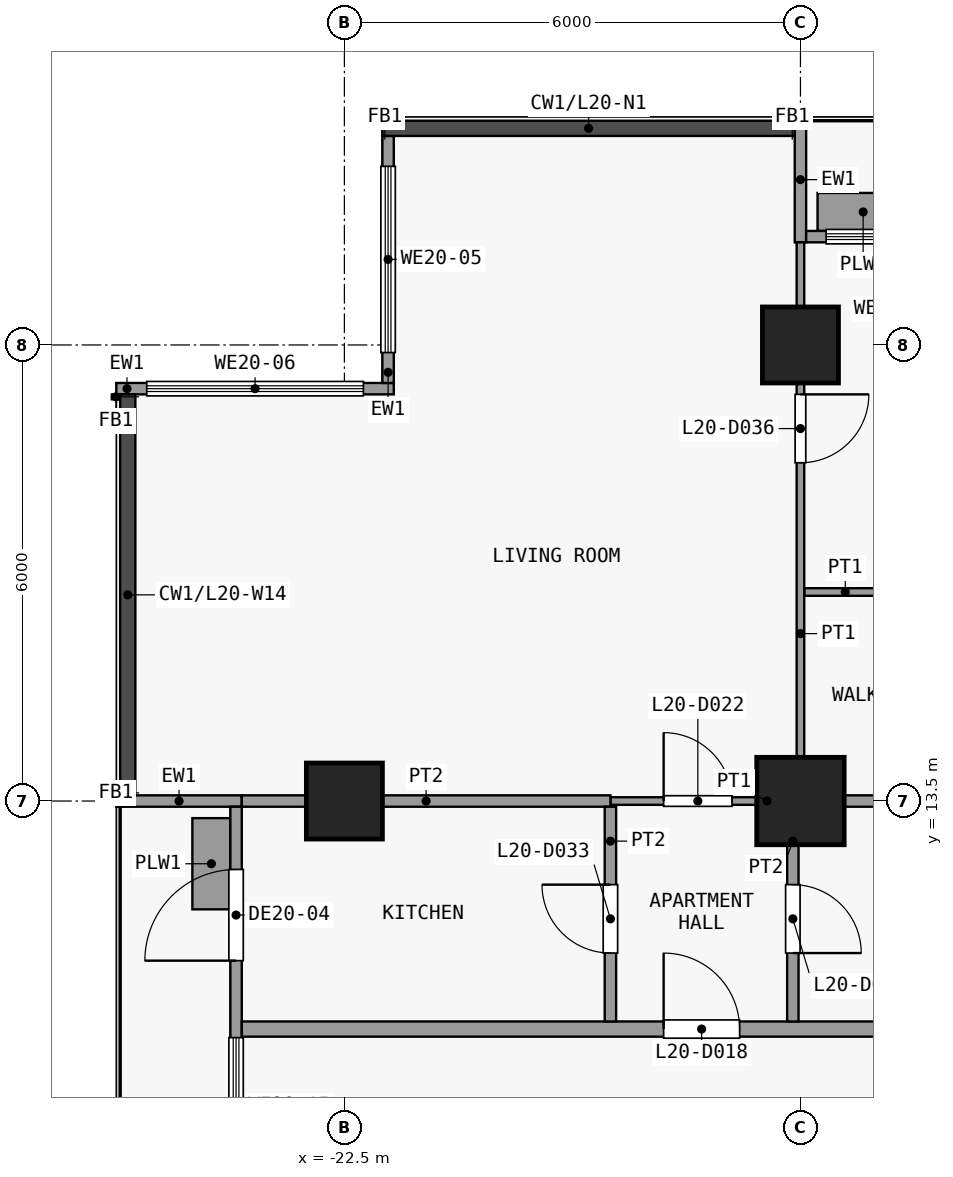
"""IFC4 building model, lengths in metres.
Left out: names, types, materials, properties, quantities, classifications, styles, units other than length and angle.
Written with IfcOpenShell. Run it as: python <this file> out.ifc"""

import sys

from ifc_helpers import new_model, si_unit, direction, frame, frame_2d, origin, origin_2d, place, context, subcontext, project, spatial, rectangle, extrude, element, fill, save


model = new_model("IFC4")
c1 = context("Model", 3, precision=1e-05, world=origin(), true_north=direction((0.0, 1.0)))
c2 = subcontext(c1, "Body", "Model", "MODEL_VIEW")
j1 = project(units=[si_unit("LENGTHUNIT", "METRE"), si_unit("PLANEANGLEUNIT", "RADIAN")], contexts=[c1])
p1 = place(None, origin())
s1 = spatial("IfcSite", under=j1, at=p1, CompositionType="ELEMENT")
p2 = place(p1, origin())
s2 = spatial("IfcBuilding", under=s1, at=p2, CompositionType="ELEMENT")
p3 = place(p2, frame((0.0, 0.0, 84.7)))
s3 = spatial("IfcBuildingStorey", under=s2, at=p3, CompositionType="ELEMENT", Elevation=84.7)
p4 = place(p3, frame((-22.5, 13.5, 0.0), z_axis=(0.0, 0.0, 1.0), x_axis=(1.0, 0.0, 0.0)))
e1 = element("IfcColumn", 1, at=p4, inside=s3, PredefinedType="COLUMN", context=c2, shape_type="SweptSolid", body=[
    extrude(rectangle(XDim=1.0, YDim=1.0, at=origin_2d()), origin(), (0.0, 0.0, 1.0), 3.6),
])
p5 = place(p3, frame((-16.5, 13.5, 0.0), z_axis=(0.0, 0.0, 1.0), x_axis=(1.0, 0.0, 0.0)))
e2 = element("IfcColumn", 2, at=p5, inside=s3, PredefinedType="COLUMN", context=c2, shape_type="SweptSolid", body=[
    extrude(rectangle(XDim=1.15, YDim=1.15, at=origin_2d()), origin(), (0.0, 0.0, 1.0), 3.6),
])
p6 = place(p3, frame((-16.5, 19.5, 0.0), z_axis=(0.0, 0.0, 1.0), x_axis=(1.0, 0.0, 0.0)))
e3 = element("IfcColumn", 3, at=p6, inside=s3, PredefinedType="COLUMN", context=c2, shape_type="SweptSolid", body=[
    extrude(rectangle(XDim=1.0, YDim=1.0, at=origin_2d()), origin(), (0.0, 0.0, 1.0), 3.6),
])
p7 = place(p3, frame((-21.925, 19.0, 0.0), z_axis=(0.0, 0.0, 1.0), x_axis=(0.0, 1.0, 0.0)))
e4 = element("IfcWall", 4, at=p7, inside=s3, PredefinedType="SOLIDWALL", context=c2, shape_type="SweptSolid", body=[
    extrude(rectangle(XDim=3.25, YDim=0.15, at=frame_2d((1.625, 0.0))), origin(), (0.0, 0.0, 1.0), 3.3),
])
p8 = place(p7, frame((0.4, 0.0, 0.9)))
e5 = element("IfcOpeningElement", 5, at=p8, cuts=e4, PredefinedType="OPENING", context=c2, shape_type="SweptSolid", body=[
    extrude(rectangle(XDim=2.45, YDim=2.4, at=frame_2d((1.225, 1.2))), frame((0.0, 0.085, 0.0), z_axis=(0.0, -1.0, 0.0), x_axis=(1.0, 0.0, 0.0)), (0.0, 0.0, 1.0), 0.17),
])
p9 = place(p3, frame((-25.5, 18.925, 0.0), z_axis=(0.0, 0.0, 1.0), x_axis=(1.0, 0.0, 0.0)))
e6 = element("IfcWall", 6, at=p9, inside=s3, PredefinedType="SOLIDWALL", context=c2, shape_type="SweptSolid", body=[
    extrude(rectangle(XDim=3.65, YDim=0.15, at=frame_2d((1.825, 0.0))), origin(), (0.0, 0.0, 1.0), 3.3),
])
p10 = place(p9, frame((0.4, 0.0, 0.9)))
e7 = element("IfcOpeningElement", 7, at=p10, cuts=e6, PredefinedType="OPENING", context=c2, shape_type="SweptSolid", body=[
    extrude(rectangle(XDim=2.85, YDim=2.4, at=frame_2d((1.425, 1.2))), frame((0.0, 0.085, 0.0), z_axis=(0.0, -1.0, 0.0), x_axis=(1.0, 0.0, 0.0)), (0.0, 0.0, 1.0), 0.17),
])
p11 = place(p3, frame((-16.5, 20.85, 0.0), z_axis=(0.0, 0.0, 1.0), x_axis=(0.0, 1.0, 0.0)))
e8 = element("IfcWall", 8, at=p11, inside=s3, PredefinedType="SOLIDWALL", context=c2, shape_type="SweptSolid", body=[
    extrude(rectangle(XDim=1.65, YDim=0.15, at=frame_2d((0.825, 0.0))), origin(), (0.0, 0.0, 1.0), 3.3),
])
p12 = place(p3, frame((-16.425, 20.925, 0.0), z_axis=(0.0, 0.0, 1.0), x_axis=(1.0, 0.0, 0.0)))
e9 = element("IfcWall", 9, at=p12, inside=s3, PredefinedType="SOLIDWALL", context=c2, shape_type="SweptSolid", body=[
    extrude(rectangle(XDim=5.85, YDim=0.15, at=frame_2d((2.925, 0.0))), origin(), (0.0, 0.0, 1.0), 3.3),
])
p13 = place(p12, frame((2.325, 0.0, 0.0)))
e10 = element("IfcOpeningElement", 10, at=p13, cuts=e9, PredefinedType="OPENING", context=c2, shape_type="SweptSolid", body=[
    extrude(rectangle(XDim=1.2, YDim=2.4, at=frame_2d((0.6, 1.2))), frame((0.0, 0.085, 0.0), z_axis=(0.0, -1.0, 0.0), x_axis=(1.0, 0.0, 0.0)), (0.0, 0.0, 1.0), 0.17),
])
p14 = place(p12, frame((0.262, 0.0, 0.9)))
e11 = element("IfcOpeningElement", 11, at=p14, cuts=e9, PredefinedType="OPENING", context=c2, shape_type="SweptSolid", body=[
    extrude(rectangle(XDim=1.8, YDim=2.1, at=frame_2d((0.9, 1.05))), frame((0.0, 0.085, 0.0), z_axis=(0.0, -1.0, 0.0), x_axis=(1.0, 0.0, 0.0)), (0.0, 0.0, 1.0), 0.17),
])
p15 = place(p12, frame((3.788, 0.0, 0.9)))
e12 = element("IfcOpeningElement", 12, at=p15, cuts=e9, PredefinedType="OPENING", context=c2, shape_type="SweptSolid", body=[
    extrude(rectangle(XDim=1.8, YDim=2.1, at=frame_2d((0.9, 1.05))), frame((0.0, 0.085, 0.0), z_axis=(0.0, -1.0, 0.0), x_axis=(1.0, 0.0, 0.0)), (0.0, 0.0, 1.0), 0.17),
])
p16 = place(p3, frame((-16.275, 21.25, 0.0), z_axis=(0.0, 0.0, 1.0), x_axis=(1.0, 0.0, 0.0)))
e13 = element("IfcWall", 13, at=p16, inside=s3, PredefinedType="USERDEFINED", context=c2, shape_type="SweptSolid", body=[
    extrude(rectangle(XDim=1.2, YDim=0.5, at=frame_2d((0.6, 0.0))), origin(), (0.0, 0.0, 1.0), 0.9),
])
p17 = place(p3, frame((-23.85, 13.5, 0.0), z_axis=(0.0, 0.0, 1.0), x_axis=(-1.0, 0.0, 0.0)))
e14 = element("IfcWall", 14, at=p17, inside=s3, PredefinedType="SOLIDWALL", context=c2, shape_type="SweptSolid", body=[
    extrude(rectangle(XDim=1.65, YDim=0.15, at=frame_2d((0.825, 0.0))), origin(), (0.0, 0.0, 1.0), 3.3),
])
p18 = place(p3, frame((-23.925, 7.575, 0.0), z_axis=(0.0, 0.0, 1.0), x_axis=(0.0, 1.0, 0.0)))
e15 = element("IfcWall", 15, at=p18, inside=s3, PredefinedType="SOLIDWALL", context=c2, shape_type="SweptSolid", body=[
    extrude(rectangle(XDim=5.85, YDim=0.15, at=frame_2d((2.925, 0.0))), origin(), (0.0, 0.0, 1.0), 3.3),
])
p19 = place(p18, frame((3.825, 0.0, 0.0)))
e16 = element("IfcOpeningElement", 16, at=p19, cuts=e15, PredefinedType="OPENING", context=c2, shape_type="SweptSolid", body=[
    extrude(rectangle(XDim=1.2, YDim=2.4, at=frame_2d((0.6, 1.2))), frame((0.0, 0.085, 0.0), z_axis=(0.0, -1.0, 0.0), x_axis=(1.0, 0.0, 0.0)), (0.0, 0.0, 1.0), 0.17),
])
p20 = place(p18, frame((1.012, 0.0, 0.9)))
e17 = element("IfcOpeningElement", 17, at=p20, cuts=e15, PredefinedType="OPENING", context=c2, shape_type="SweptSolid", body=[
    extrude(rectangle(XDim=1.8, YDim=2.1, at=frame_2d((0.9, 1.05))), frame((0.0, 0.085, 0.0), z_axis=(0.0, -1.0, 0.0), x_axis=(1.0, 0.0, 0.0)), (0.0, 0.0, 1.0), 0.17),
])
p21 = place(p3, frame((-24.25, 12.075, 0.0), z_axis=(0.0, 0.0, 1.0), x_axis=(0.0, 1.0, 0.0)))
e18 = element("IfcWall", 18, at=p21, inside=s3, PredefinedType="USERDEFINED", context=c2, shape_type="SweptSolid", body=[
    extrude(rectangle(XDim=1.2, YDim=0.5, at=frame_2d((0.6, 0.0))), origin(), (0.0, 0.0, 1.0), 0.9),
])
p22 = place(p3, frame((-23.85, 10.5, 0.0), z_axis=(0.0, 0.0, 1.0), x_axis=(1.0, 0.0, 0.0)))
e19 = element("IfcWall", 19, at=p22, inside=s3, PredefinedType="PARTITIONING", context=c2, shape_type="SweptSolid", body=[
    extrude(rectangle(XDim=49.2, YDim=0.2, at=frame_2d((24.6, 0.0))), origin(), (0.0, 0.0, 1.0), 3.3),
])
p23 = place(p22, frame((5.55, 0.0, 0.0)))
e20 = element("IfcOpeningElement", 20, at=p23, cuts=e19, PredefinedType="OPENING", context=c2, shape_type="SweptSolid", body=[
    extrude(rectangle(XDim=1.0, YDim=2.1, at=frame_2d((0.5, 1.05))), frame((0.0, 0.11, 0.0), z_axis=(0.0, -1.0, 0.0), x_axis=(1.0, 0.0, 0.0)), (0.0, 0.0, 1.0), 0.22),
])
p24 = place(p22, frame((14.05, 0.0, 0.0)))
e21 = element("IfcOpeningElement", 21, at=p24, cuts=e19, PredefinedType="OPENING", context=c2, shape_type="SweptSolid", body=[
    extrude(rectangle(XDim=1.0, YDim=2.1, at=frame_2d((0.5, 1.05))), frame((0.0, 0.11, 0.0), z_axis=(0.0, -1.0, 0.0), x_axis=(1.0, 0.0, 0.0)), (0.0, 0.0, 1.0), 0.22),
])
p25 = place(p22, frame((22.55, 0.0, 0.0)))
e22 = element("IfcOpeningElement", 22, at=p25, cuts=e19, PredefinedType="OPENING", context=c2, shape_type="SweptSolid", body=[
    extrude(rectangle(XDim=1.0, YDim=2.1, at=frame_2d((0.5, 1.05))), frame((0.0, 0.11, 0.0), z_axis=(0.0, -1.0, 0.0), x_axis=(1.0, 0.0, 0.0)), (0.0, 0.0, 1.0), 0.22),
])
p26 = place(p22, frame((43.55, 0.0, 0.0)))
e23 = element("IfcOpeningElement", 23, at=p26, cuts=e19, PredefinedType="OPENING", context=c2, shape_type="SweptSolid", body=[
    extrude(rectangle(XDim=1.0, YDim=2.1, at=frame_2d((0.5, 1.05))), frame((0.0, 0.11, 0.0), z_axis=(0.0, -1.0, 0.0), x_axis=(1.0, 0.0, 0.0)), (0.0, 0.0, 1.0), 0.22),
])
p27 = place(p3, frame((-19.0, 13.5, 0.0), z_axis=(0.0, 0.0, 1.0), x_axis=(1.0, 0.0, 0.0)))
e24 = element("IfcWall", 24, at=p27, inside=s3, PredefinedType="PARTITIONING", context=c2, shape_type="SweptSolid", body=[
    extrude(rectangle(XDim=2.4, YDim=0.1, at=frame_2d((1.2, 0.0))), origin(), (0.0, 0.0, 1.0), 3.3),
])
p28 = place(p27, frame((0.7, 0.0, 0.0)))
e25 = element("IfcOpeningElement", 25, at=p28, cuts=e24, PredefinedType="OPENING", context=c2, shape_type="SweptSolid", body=[
    extrude(rectangle(XDim=0.9, YDim=2.1, at=frame_2d((0.45, 1.05))), frame((0.0, 0.06, 0.0), z_axis=(0.0, -1.0, 0.0), x_axis=(1.0, 0.0, 0.0)), (0.0, 0.0, 1.0), 0.12),
])
p29 = place(p3, frame((-23.85, 13.5, 0.0), z_axis=(0.0, 0.0, 1.0), x_axis=(1.0, 0.0, 0.0)))
e26 = element("IfcWall", 26, at=p29, inside=s3, PredefinedType="PARTITIONING", context=c2, shape_type="SweptSolid", body=[
    extrude(rectangle(XDim=4.85, YDim=0.15, at=frame_2d((2.425, 0.0))), origin(), (0.0, 0.0, 1.0), 3.3),
])
p30 = place(p3, frame((-16.5, 13.5, 0.0), z_axis=(0.0, 0.0, 1.0), x_axis=(1.0, 0.0, 0.0)))
e27 = element("IfcWall", 27, at=p30, inside=s3, PredefinedType="PARTITIONING", context=c2, shape_type="SweptSolid", body=[
    extrude(rectangle(XDim=6.0, YDim=0.15, at=frame_2d((3.0, 0.0))), origin(), (0.0, 0.0, 1.0), 3.3),
])
p31 = place(p3, frame((-16.45, 16.25, 0.0), z_axis=(0.0, 0.0, 1.0), x_axis=(1.0, 0.0, 0.0)))
e28 = element("IfcWall", 28, at=p31, inside=s3, PredefinedType="PARTITIONING", context=c2, shape_type="SweptSolid", body=[
    extrude(rectangle(XDim=3.25, YDim=0.1, at=frame_2d((1.625, 0.0))), origin(), (0.0, 0.0, 1.0), 3.3),
])
p32 = place(p31, frame((1.2, 0.0, 0.0)))
e29 = element("IfcOpeningElement", 29, at=p32, cuts=e28, PredefinedType="OPENING", context=c2, shape_type="SweptSolid", body=[
    extrude(rectangle(XDim=0.9, YDim=2.1, at=frame_2d((0.45, 1.05))), frame((0.0, 0.06, 0.0), z_axis=(0.0, -1.0, 0.0), x_axis=(1.0, 0.0, 0.0)), (0.0, 0.0, 1.0), 0.12),
])
p33 = place(p3, frame((-19.0, 10.6, 0.0), z_axis=(0.0, 0.0, 1.0), x_axis=(0.0, 1.0, 0.0)))
e30 = element("IfcWall", 30, at=p33, inside=s3, PredefinedType="PARTITIONING", context=c2, shape_type="SweptSolid", body=[
    extrude(rectangle(XDim=2.825, YDim=0.15, at=frame_2d((1.413, 0.0))), origin(), (0.0, 0.0, 1.0), 3.3),
])
p34 = place(p33, frame((0.9, 0.0, 0.0)))
e31 = element("IfcOpeningElement", 31, at=p34, cuts=e30, PredefinedType="OPENING", context=c2, shape_type="SweptSolid", body=[
    extrude(rectangle(XDim=0.9, YDim=2.1, at=frame_2d((0.45, 1.05))), frame((0.0, 0.085, 0.0), z_axis=(0.0, -1.0, 0.0), x_axis=(1.0, 0.0, 0.0)), (0.0, 0.0, 1.0), 0.17),
])
p35 = place(p3, frame((-16.6, 10.6, 0.0), z_axis=(0.0, 0.0, 1.0), x_axis=(0.0, 1.0, 0.0)))
e32 = element("IfcWall", 32, at=p35, inside=s3, PredefinedType="PARTITIONING", context=c2, shape_type="SweptSolid", body=[
    extrude(rectangle(XDim=2.825, YDim=0.15, at=frame_2d((1.413, 0.0))), origin(), (0.0, 0.0, 1.0), 3.3),
])
p36 = place(p35, frame((0.9, 0.0, 0.0)))
e33 = element("IfcOpeningElement", 33, at=p36, cuts=e32, PredefinedType="OPENING", context=c2, shape_type="SweptSolid", body=[
    extrude(rectangle(XDim=0.9, YDim=2.1, at=frame_2d((0.45, 1.05))), frame((0.0, 0.085, 0.0), z_axis=(0.0, -1.0, 0.0), x_axis=(1.0, 0.0, 0.0)), (0.0, 0.0, 1.0), 0.17),
])
p37 = place(p3, frame((-16.5, 13.575, 0.0), z_axis=(0.0, 0.0, 1.0), x_axis=(0.0, 1.0, 0.0)))
e34 = element("IfcWall", 34, at=p37, inside=s3, PredefinedType="PARTITIONING", context=c2, shape_type="SweptSolid", body=[
    extrude(rectangle(XDim=7.275, YDim=0.1, at=frame_2d((3.638, 0.0))), origin(), (0.0, 0.0, 1.0), 3.3),
])
p38 = place(p37, frame((4.375, 0.0, 0.0)))
e35 = element("IfcOpeningElement", 35, at=p38, cuts=e34, PredefinedType="OPENING", context=c2, shape_type="SweptSolid", body=[
    extrude(rectangle(XDim=0.9, YDim=2.1, at=frame_2d((0.45, 1.05))), frame((0.0, 0.06, 0.0), z_axis=(0.0, -1.0, 0.0), x_axis=(1.0, 0.0, 0.0)), (0.0, 0.0, 1.0), 0.12),
])
p39 = place(p8, origin())
e36 = element("IfcWindow", 36, at=p39, inside=s3, PartitioningType="SINGLE_PANEL", PredefinedType="WINDOW", context=c2, shape_type="SweptSolid", body=[
    extrude(rectangle(XDim=2.45, YDim=2.4, at=frame_2d((1.225, 1.2))), frame((0.0, 0.03, 0.0), z_axis=(0.0, -1.0, 0.0), x_axis=(1.0, 0.0, 0.0)), (0.0, 0.0, 1.0), 0.06),
])
fill(e5, e36)
p40 = place(p10, origin())
e37 = element("IfcWindow", 37, at=p40, inside=s3, PartitioningType="SINGLE_PANEL", PredefinedType="WINDOW", context=c2, shape_type="SweptSolid", body=[
    extrude(rectangle(XDim=2.85, YDim=2.4, at=frame_2d((1.425, 1.2))), frame((0.0, 0.03, 0.0), z_axis=(0.0, -1.0, 0.0), x_axis=(1.0, 0.0, 0.0)), (0.0, 0.0, 1.0), 0.06),
])
fill(e7, e37)
p41 = place(p14, origin())
e38 = element("IfcWindow", 38, at=p41, inside=s3, PartitioningType="SINGLE_PANEL", PredefinedType="WINDOW", context=c2, shape_type="SweptSolid", body=[
    extrude(rectangle(XDim=1.8, YDim=2.1, at=frame_2d((0.9, 1.05))), frame((0.0, 0.03, 0.0), z_axis=(0.0, -1.0, 0.0), x_axis=(1.0, 0.0, 0.0)), (0.0, 0.0, 1.0), 0.06),
])
fill(e11, e38)
p42 = place(p19, origin())
e39 = element("IfcDoor", 39, at=p42, inside=s3, OperationType="SINGLE_SWING_LEFT", PredefinedType="DOOR", context=c2, shape_type="SweptSolid", body=[
    extrude(rectangle(XDim=1.2, YDim=2.4, at=frame_2d((0.6, 1.2))), frame((0.0, 0.025, 0.0), z_axis=(0.0, -1.0, 0.0), x_axis=(1.0, 0.0, 0.0)), (0.0, 0.0, 1.0), 0.05),
])
fill(e16, e39)
p43 = place(p20, origin())
e40 = element("IfcWindow", 40, at=p43, inside=s3, PartitioningType="SINGLE_PANEL", PredefinedType="WINDOW", context=c2, shape_type="SweptSolid", body=[
    extrude(rectangle(XDim=1.8, YDim=2.1, at=frame_2d((0.9, 1.05))), frame((0.0, 0.03, 0.0), z_axis=(0.0, -1.0, 0.0), x_axis=(1.0, 0.0, 0.0)), (0.0, 0.0, 1.0), 0.06),
])
fill(e17, e40)
p44 = place(p23, origin())
e41 = element("IfcDoor", 41, at=p44, inside=s3, OperationType="SINGLE_SWING_RIGHT", PredefinedType="DOOR", context=c2, shape_type="SweptSolid", body=[
    extrude(rectangle(XDim=1.0, YDim=2.1, at=frame_2d((0.5, 1.05))), frame((0.0, 0.025, 0.0), z_axis=(0.0, -1.0, 0.0), x_axis=(1.0, 0.0, 0.0)), (0.0, 0.0, 1.0), 0.05),
])
fill(e20, e41)
p45 = place(p28, origin())
e42 = element("IfcDoor", 42, at=p45, inside=s3, OperationType="SINGLE_SWING_RIGHT", PredefinedType="DOOR", context=c2, shape_type="SweptSolid", body=[
    extrude(rectangle(XDim=0.9, YDim=2.1, at=frame_2d((0.45, 1.05))), frame((0.0, 0.025, 0.0), z_axis=(0.0, -1.0, 0.0), x_axis=(1.0, 0.0, 0.0)), (0.0, 0.0, 1.0), 0.05),
])
fill(e25, e42)
p46 = place(p34, origin())
e43 = element("IfcDoor", 43, at=p46, inside=s3, OperationType="SINGLE_SWING_LEFT", PredefinedType="DOOR", context=c2, shape_type="SweptSolid", body=[
    extrude(rectangle(XDim=0.9, YDim=2.1, at=frame_2d((0.45, 1.05))), frame((0.0, 0.025, 0.0), z_axis=(0.0, -1.0, 0.0), x_axis=(1.0, 0.0, 0.0)), (0.0, 0.0, 1.0), 0.05),
])
fill(e31, e43)
p47 = place(p36, origin())
e44 = element("IfcDoor", 44, at=p47, inside=s3, OperationType="SINGLE_SWING_LEFT", PredefinedType="DOOR", context=c2, shape_type="SweptSolid", body=[
    extrude(rectangle(XDim=0.9, YDim=2.1, at=frame_2d((0.45, 1.05))), frame((0.0, 0.025, 0.0), z_axis=(0.0, -1.0, 0.0), x_axis=(1.0, 0.0, 0.0)), (0.0, 0.0, 1.0), 0.05),
])
fill(e33, e44)
p48 = place(p38, origin())
e45 = element("IfcDoor", 45, at=p48, inside=s3, OperationType="SINGLE_SWING_RIGHT", PredefinedType="DOOR", context=c2, shape_type="SweptSolid", body=[
    extrude(rectangle(XDim=0.9, YDim=2.1, at=frame_2d((0.45, 1.05))), frame((0.0, 0.025, 0.0), z_axis=(0.0, -1.0, 0.0), x_axis=(1.0, 0.0, 0.0)), (0.0, 0.0, 1.0), 0.05),
])
fill(e35, e45)
save(model, sys.argv[1])
